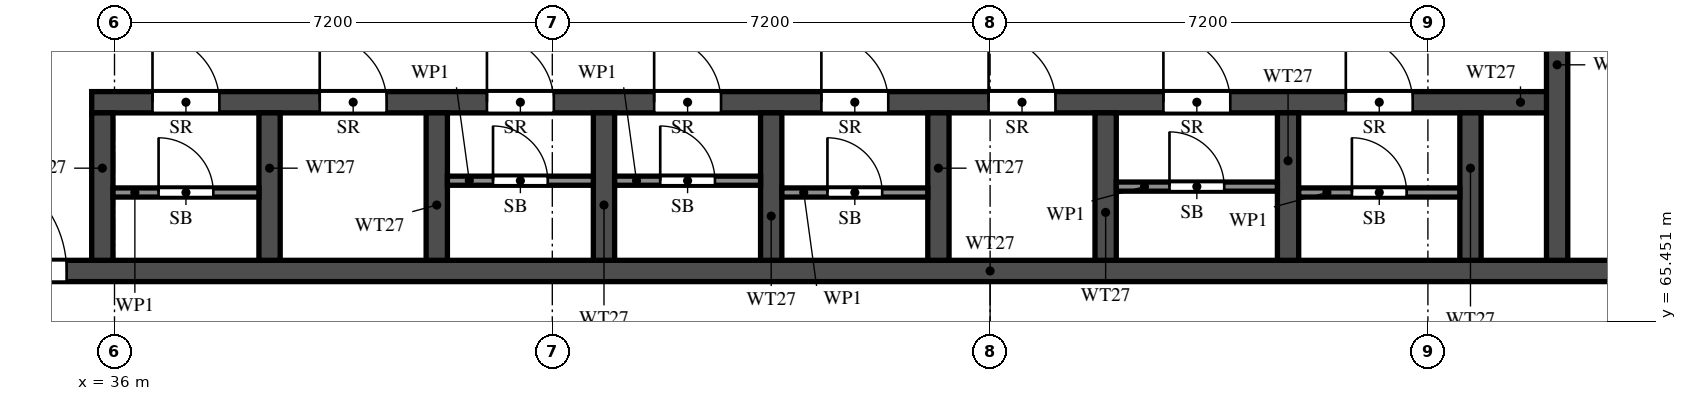
"""IFC4 building model, lengths in metres.
Left out: names, types, materials, properties, quantities, classifications, styles, units other than length and angle.
Written with IfcOpenShell. Run it as: python <this file> out.ifc"""

import sys

from ifc_helpers import new_model, si_unit, direction, frame, frame_2d, origin, place, context, subcontext, project, spatial, rectangle, extrude, element, fill, save


model = new_model("IFC4")
c1 = context("Model", 3, precision=1e-05, world=origin(), true_north=direction((0.0, 1.0)))
c2 = subcontext(c1, "Body", "Model", "MODEL_VIEW")
j1 = project(units=[si_unit("LENGTHUNIT", "METRE"), si_unit("PLANEANGLEUNIT", "RADIAN")], contexts=[c1])
p1 = place(None, origin())
s1 = spatial("IfcSite", under=j1, at=p1, CompositionType="ELEMENT")
p2 = place(p1, origin())
s2 = spatial("IfcBuilding", under=s1, at=p2, CompositionType="ELEMENT")
p3 = place(p2, frame((0.0, 0.0, 181.5)))
s3 = spatial("IfcBuildingStorey", under=s2, at=p3, CompositionType="ELEMENT", Elevation=181.5)
p4 = place(p3, frame((29.7, 66.275, 0.0), z_axis=(0.0, 0.0, 1.0), x_axis=(1.0, 0.0, 0.0)))
e1 = element("IfcWall", 1, at=p4, inside=s3, PredefinedType="SHEAR", context=c2, shape_type="SweptSolid", body=[
    extrude(rectangle(XDim=41.4, YDim=0.35, at=frame_2d((20.7, 0.0))), origin(), (0.0, 0.0, 1.0), 3.2),
])
p5 = place(p4, frame((0.925, 0.0, 0.0)))
e2 = element("IfcOpeningElement", 2, at=p5, cuts=e1, PredefinedType="OPENING", context=c2, shape_type="SweptSolid", body=[
    extrude(rectangle(XDim=1.1, YDim=2.1, at=frame_2d((0.55, 1.05))), frame((0.0, 0.185, 0.0), z_axis=(0.0, -1.0, 0.0), x_axis=(1.0, 0.0, 0.0)), (0.0, 0.0, 1.0), 0.37),
])
p6 = place(p4, frame((3.712, 0.0, 0.0)))
e3 = element("IfcOpeningElement", 3, at=p6, cuts=e1, PredefinedType="OPENING", context=c2, shape_type="SweptSolid", body=[
    extrude(rectangle(XDim=1.8, YDim=2.1, at=frame_2d((0.9, 1.05))), frame((0.0, 0.185, 0.0), z_axis=(0.0, -1.0, 0.0), x_axis=(1.0, 0.0, 0.0)), (0.0, 0.0, 1.0), 0.37),
])
p7 = place(p3, frame((35.625, 69.05, 0.0), z_axis=(0.0, 0.0, 1.0), x_axis=(1.0, 0.0, 0.0)))
e4 = element("IfcWall", 4, at=p7, inside=s3, PredefinedType="SHEAR", context=c2, shape_type="SweptSolid", body=[
    extrude(rectangle(XDim=24.1, YDim=0.35, at=frame_2d((12.05, 0.0))), origin(), (0.0, 0.0, 1.0), 3.2),
])
p8 = place(p7, frame((1.0, 0.0, 0.0)))
e5 = element("IfcOpeningElement", 5, at=p8, cuts=e4, PredefinedType="OPENING", context=c2, shape_type="SweptSolid", body=[
    extrude(rectangle(XDim=1.1, YDim=2.1, at=frame_2d((0.55, 1.05))), frame((0.0, 0.185, 0.0), z_axis=(0.0, -1.0, 0.0), x_axis=(1.0, 0.0, 0.0)), (0.0, 0.0, 1.0), 0.37),
])
p9 = place(p7, frame((3.75, 0.0, 0.0)))
e6 = element("IfcOpeningElement", 6, at=p9, cuts=e4, PredefinedType="OPENING", context=c2, shape_type="SweptSolid", body=[
    extrude(rectangle(XDim=1.1, YDim=2.1, at=frame_2d((0.55, 1.05))), frame((0.0, 0.185, 0.0), z_axis=(0.0, -1.0, 0.0), x_axis=(1.0, 0.0, 0.0)), (0.0, 0.0, 1.0), 0.37),
])
p10 = place(p7, frame((6.5, 0.0, 0.0)))
e7 = element("IfcOpeningElement", 7, at=p10, cuts=e4, PredefinedType="OPENING", context=c2, shape_type="SweptSolid", body=[
    extrude(rectangle(XDim=1.1, YDim=2.1, at=frame_2d((0.55, 1.05))), frame((0.0, 0.185, 0.0), z_axis=(0.0, -1.0, 0.0), x_axis=(1.0, 0.0, 0.0)), (0.0, 0.0, 1.0), 0.37),
])
p11 = place(p7, frame((9.25, 0.0, 0.0)))
e8 = element("IfcOpeningElement", 8, at=p11, cuts=e4, PredefinedType="OPENING", context=c2, shape_type="SweptSolid", body=[
    extrude(rectangle(XDim=1.1, YDim=2.1, at=frame_2d((0.55, 1.05))), frame((0.0, 0.185, 0.0), z_axis=(0.0, -1.0, 0.0), x_axis=(1.0, 0.0, 0.0)), (0.0, 0.0, 1.0), 0.37),
])
p12 = place(p7, frame((12.0, 0.0, 0.0)))
e9 = element("IfcOpeningElement", 9, at=p12, cuts=e4, PredefinedType="OPENING", context=c2, shape_type="SweptSolid", body=[
    extrude(rectangle(XDim=1.1, YDim=2.1, at=frame_2d((0.55, 1.05))), frame((0.0, 0.185, 0.0), z_axis=(0.0, -1.0, 0.0), x_axis=(1.0, 0.0, 0.0)), (0.0, 0.0, 1.0), 0.37),
])
p13 = place(p7, frame((14.75, 0.0, 0.0)))
e10 = element("IfcOpeningElement", 10, at=p13, cuts=e4, PredefinedType="OPENING", context=c2, shape_type="SweptSolid", body=[
    extrude(rectangle(XDim=1.1, YDim=2.1, at=frame_2d((0.55, 1.05))), frame((0.0, 0.185, 0.0), z_axis=(0.0, -1.0, 0.0), x_axis=(1.0, 0.0, 0.0)), (0.0, 0.0, 1.0), 0.37),
])
p14 = place(p7, frame((17.625, 0.0, 0.0)))
e11 = element("IfcOpeningElement", 11, at=p14, cuts=e4, PredefinedType="OPENING", context=c2, shape_type="SweptSolid", body=[
    extrude(rectangle(XDim=1.1, YDim=2.1, at=frame_2d((0.55, 1.05))), frame((0.0, 0.185, 0.0), z_axis=(0.0, -1.0, 0.0), x_axis=(1.0, 0.0, 0.0)), (0.0, 0.0, 1.0), 0.37),
])
p15 = place(p7, frame((20.625, 0.0, 0.0)))
e12 = element("IfcOpeningElement", 12, at=p15, cuts=e4, PredefinedType="OPENING", context=c2, shape_type="SweptSolid", body=[
    extrude(rectangle(XDim=1.1, YDim=2.1, at=frame_2d((0.55, 1.05))), frame((0.0, 0.185, 0.0), z_axis=(0.0, -1.0, 0.0), x_axis=(1.0, 0.0, 0.0)), (0.0, 0.0, 1.0), 0.37),
])
p16 = place(p3, frame((59.725, 66.45, 0.0), z_axis=(0.0, 0.0, 1.0), x_axis=(0.0, 1.0, 0.0)))
e13 = element("IfcWall", 13, at=p16, inside=s3, PredefinedType="SHEAR", context=c2, shape_type="SweptSolid", body=[
    extrude(rectangle(XDim=6.125, YDim=0.35, at=frame_2d((3.062, 0.0))), origin(), (0.0, 0.0, 1.0), 3.2),
])
p17 = place(p16, frame((3.85, 0.0, 0.0)))
e14 = element("IfcOpeningElement", 14, at=p17, cuts=e13, PredefinedType="OPENING", context=c2, shape_type="SweptSolid", body=[
    extrude(rectangle(XDim=1.2, YDim=2.1, at=frame_2d((0.6, 1.05))), frame((0.0, 0.185, 0.0), z_axis=(0.0, -1.0, 0.0), x_axis=(1.0, 0.0, 0.0)), (0.0, 0.0, 1.0), 0.37),
])
for number, where, z_axis, x_axis in (
    (15, (35.8, 66.45, 0.0), (0.0, 0.0, 1.0), (0.0, 1.0, 0.0)),
    (16, (38.55, 66.45, 0.0), (0.0, 0.0, 1.0), (0.0, 1.0, 0.0)),
    (17, (41.3, 66.45, 0.0), (0.0, 0.0, 1.0), (0.0, 1.0, 0.0)),
    (18, (44.05, 66.45, 0.0), (0.0, 0.0, 1.0), (0.0, 1.0, 0.0)),
    (19, (46.8, 66.45, 0.0), (0.0, 0.0, 1.0), (0.0, 1.0, 0.0)),
    (20, (49.55, 66.45, 0.0), (0.0, 0.0, 1.0), (0.0, 1.0, 0.0)),
    (21, (52.3, 66.45, 0.0), (0.0, 0.0, 1.0), (0.0, 1.0, 0.0)),
    (22, (55.3, 66.45, 0.0), (0.0, 0.0, 1.0), (0.0, 1.0, 0.0)),
    (23, (58.3, 66.45, 0.0), (0.0, 0.0, 1.0), (0.0, 1.0, 0.0)),
):
    element("IfcWall", number, at=place(p3, frame(where, z_axis=z_axis, x_axis=x_axis)), inside=s3, PredefinedType="SHEAR", context=c2, shape_type="SweptSolid", body=[
        extrude(rectangle(XDim=2.425, YDim=0.35, at=frame_2d((1.212, 0.0))), origin(), (0.0, 0.0, 1.0), 3.2),
    ])
p18 = place(p3, frame((35.975, 67.565, 0.0), z_axis=(0.0, 0.0, 1.0), x_axis=(1.0, 0.0, 0.0)))
e24 = element("IfcWall", 24, at=p18, inside=s3, PredefinedType="PARTITIONING", context=c2, shape_type="SweptSolid", body=[
    extrude(rectangle(XDim=2.4, YDim=0.15, at=frame_2d((1.2, 0.0))), origin(), (0.0, 0.0, 1.0), 3.2),
])
p19 = place(p18, frame((0.75, 0.0, 0.0)))
e25 = element("IfcOpeningElement", 25, at=p19, cuts=e24, PredefinedType="OPENING", context=c2, shape_type="SweptSolid", body=[
    extrude(rectangle(XDim=0.9, YDim=2.1, at=frame_2d((0.45, 1.05))), frame((0.0, 0.085, 0.0), z_axis=(0.0, -1.0, 0.0), x_axis=(1.0, 0.0, 0.0)), (0.0, 0.0, 1.0), 0.17),
])
p20 = place(p3, frame((41.475, 67.76, 0.0), z_axis=(0.0, 0.0, 1.0), x_axis=(1.0, 0.0, 0.0)))
e26 = element("IfcWall", 26, at=p20, inside=s3, PredefinedType="PARTITIONING", context=c2, shape_type="SweptSolid", body=[
    extrude(rectangle(XDim=2.4, YDim=0.15, at=frame_2d((1.2, 0.0))), origin(), (0.0, 0.0, 1.0), 3.2),
])
p21 = place(p20, frame((0.75, 0.0, 0.0)))
e27 = element("IfcOpeningElement", 27, at=p21, cuts=e26, PredefinedType="OPENING", context=c2, shape_type="SweptSolid", body=[
    extrude(rectangle(XDim=0.9, YDim=2.1, at=frame_2d((0.45, 1.05))), frame((0.0, 0.085, 0.0), z_axis=(0.0, -1.0, 0.0), x_axis=(1.0, 0.0, 0.0)), (0.0, 0.0, 1.0), 0.17),
])
p22 = place(p3, frame((44.225, 67.76, 0.0), z_axis=(0.0, 0.0, 1.0), x_axis=(1.0, 0.0, 0.0)))
e28 = element("IfcWall", 28, at=p22, inside=s3, PredefinedType="PARTITIONING", context=c2, shape_type="SweptSolid", body=[
    extrude(rectangle(XDim=2.4, YDim=0.15, at=frame_2d((1.2, 0.0))), origin(), (0.0, 0.0, 1.0), 3.2),
])
p23 = place(p22, frame((0.75, 0.0, 0.0)))
e29 = element("IfcOpeningElement", 29, at=p23, cuts=e28, PredefinedType="OPENING", context=c2, shape_type="SweptSolid", body=[
    extrude(rectangle(XDim=0.9, YDim=2.1, at=frame_2d((0.45, 1.05))), frame((0.0, 0.085, 0.0), z_axis=(0.0, -1.0, 0.0), x_axis=(1.0, 0.0, 0.0)), (0.0, 0.0, 1.0), 0.17),
])
p24 = place(p3, frame((46.975, 67.565, 0.0), z_axis=(0.0, 0.0, 1.0), x_axis=(1.0, 0.0, 0.0)))
e30 = element("IfcWall", 30, at=p24, inside=s3, PredefinedType="PARTITIONING", context=c2, shape_type="SweptSolid", body=[
    extrude(rectangle(XDim=2.4, YDim=0.15, at=frame_2d((1.2, 0.0))), origin(), (0.0, 0.0, 1.0), 3.2),
])
p25 = place(p24, frame((0.75, 0.0, 0.0)))
e31 = element("IfcOpeningElement", 31, at=p25, cuts=e30, PredefinedType="OPENING", context=c2, shape_type="SweptSolid", body=[
    extrude(rectangle(XDim=0.9, YDim=2.1, at=frame_2d((0.45, 1.05))), frame((0.0, 0.085, 0.0), z_axis=(0.0, -1.0, 0.0), x_axis=(1.0, 0.0, 0.0)), (0.0, 0.0, 1.0), 0.17),
])
p26 = place(p3, frame((52.475, 67.663, 0.0), z_axis=(0.0, 0.0, 1.0), x_axis=(1.0, 0.0, 0.0)))
e32 = element("IfcWall", 32, at=p26, inside=s3, PredefinedType="PARTITIONING", context=c2, shape_type="SweptSolid", body=[
    extrude(rectangle(XDim=2.65, YDim=0.15, at=frame_2d((1.325, 0.0))), origin(), (0.0, 0.0, 1.0), 3.2),
])
p27 = place(p26, frame((0.875, 0.0, 0.0)))
e33 = element("IfcOpeningElement", 33, at=p27, cuts=e32, PredefinedType="OPENING", context=c2, shape_type="SweptSolid", body=[
    extrude(rectangle(XDim=0.9, YDim=2.1, at=frame_2d((0.45, 1.05))), frame((0.0, 0.085, 0.0), z_axis=(0.0, -1.0, 0.0), x_axis=(1.0, 0.0, 0.0)), (0.0, 0.0, 1.0), 0.17),
])
p28 = place(p3, frame((55.475, 67.565, 0.0), z_axis=(0.0, 0.0, 1.0), x_axis=(1.0, 0.0, 0.0)))
e34 = element("IfcWall", 34, at=p28, inside=s3, PredefinedType="PARTITIONING", context=c2, shape_type="SweptSolid", body=[
    extrude(rectangle(XDim=2.65, YDim=0.15, at=frame_2d((1.325, 0.0))), origin(), (0.0, 0.0, 1.0), 3.2),
])
p29 = place(p28, frame((0.875, 0.0, 0.0)))
e35 = element("IfcOpeningElement", 35, at=p29, cuts=e34, PredefinedType="OPENING", context=c2, shape_type="SweptSolid", body=[
    extrude(rectangle(XDim=0.9, YDim=2.1, at=frame_2d((0.45, 1.05))), frame((0.0, 0.085, 0.0), z_axis=(0.0, -1.0, 0.0), x_axis=(1.0, 0.0, 0.0)), (0.0, 0.0, 1.0), 0.17),
])
p30 = place(p6, origin())
e36 = element("IfcDoor", 36, at=p30, inside=s3, OperationType="DOUBLE_DOOR_SINGLE_SWING", PredefinedType="DOOR", context=c2, shape_type="SweptSolid", body=[
    extrude(rectangle(XDim=1.8, YDim=2.1, at=frame_2d((0.9, 1.05))), frame((0.0, 0.025, 0.0), z_axis=(0.0, -1.0, 0.0), x_axis=(1.0, 0.0, 0.0)), (0.0, 0.0, 1.0), 0.05),
])
fill(e3, e36)
p31 = place(p8, origin())
e37 = element("IfcDoor", 37, at=p31, inside=s3, OperationType="SINGLE_SWING_RIGHT", PredefinedType="DOOR", context=c2, shape_type="SweptSolid", body=[
    extrude(rectangle(XDim=1.1, YDim=2.1, at=frame_2d((0.55, 1.05))), frame((0.0, 0.025, 0.0), z_axis=(0.0, -1.0, 0.0), x_axis=(1.0, 0.0, 0.0)), (0.0, 0.0, 1.0), 0.05),
])
fill(e5, e37)
p32 = place(p19, origin())
e38 = element("IfcDoor", 38, at=p32, inside=s3, OperationType="SINGLE_SWING_RIGHT", PredefinedType="DOOR", context=c2, shape_type="SweptSolid", body=[
    extrude(rectangle(XDim=0.9, YDim=2.1, at=frame_2d((0.45, 1.05))), frame((0.0, 0.025, 0.0), z_axis=(0.0, -1.0, 0.0), x_axis=(1.0, 0.0, 0.0)), (0.0, 0.0, 1.0), 0.05),
])
fill(e25, e38)
p33 = place(p9, origin())
e39 = element("IfcDoor", 39, at=p33, inside=s3, OperationType="SINGLE_SWING_LEFT", PredefinedType="DOOR", context=c2, shape_type="SweptSolid", body=[
    extrude(rectangle(XDim=1.1, YDim=2.1, at=frame_2d((0.55, 1.05))), frame((0.0, 0.025, 0.0), z_axis=(0.0, -1.0, 0.0), x_axis=(1.0, 0.0, 0.0)), (0.0, 0.0, 1.0), 0.05),
])
fill(e6, e39)
p34 = place(p10, origin())
e40 = element("IfcDoor", 40, at=p34, inside=s3, OperationType="SINGLE_SWING_RIGHT", PredefinedType="DOOR", context=c2, shape_type="SweptSolid", body=[
    extrude(rectangle(XDim=1.1, YDim=2.1, at=frame_2d((0.55, 1.05))), frame((0.0, 0.025, 0.0), z_axis=(0.0, -1.0, 0.0), x_axis=(1.0, 0.0, 0.0)), (0.0, 0.0, 1.0), 0.05),
])
fill(e7, e40)
p35 = place(p21, origin())
e41 = element("IfcDoor", 41, at=p35, inside=s3, OperationType="SINGLE_SWING_LEFT", PredefinedType="DOOR", context=c2, shape_type="SweptSolid", body=[
    extrude(rectangle(XDim=0.9, YDim=2.1, at=frame_2d((0.45, 1.05))), frame((0.0, 0.025, 0.0), z_axis=(0.0, -1.0, 0.0), x_axis=(1.0, 0.0, 0.0)), (0.0, 0.0, 1.0), 0.05),
])
fill(e27, e41)
p36 = place(p11, origin())
e42 = element("IfcDoor", 42, at=p36, inside=s3, OperationType="SINGLE_SWING_LEFT", PredefinedType="DOOR", context=c2, shape_type="SweptSolid", body=[
    extrude(rectangle(XDim=1.1, YDim=2.1, at=frame_2d((0.55, 1.05))), frame((0.0, 0.025, 0.0), z_axis=(0.0, -1.0, 0.0), x_axis=(1.0, 0.0, 0.0)), (0.0, 0.0, 1.0), 0.05),
])
fill(e8, e42)
p37 = place(p23, origin())
e43 = element("IfcDoor", 43, at=p37, inside=s3, OperationType="SINGLE_SWING_RIGHT", PredefinedType="DOOR", context=c2, shape_type="SweptSolid", body=[
    extrude(rectangle(XDim=0.9, YDim=2.1, at=frame_2d((0.45, 1.05))), frame((0.0, 0.025, 0.0), z_axis=(0.0, -1.0, 0.0), x_axis=(1.0, 0.0, 0.0)), (0.0, 0.0, 1.0), 0.05),
])
fill(e29, e43)
p38 = place(p12, origin())
e44 = element("IfcDoor", 44, at=p38, inside=s3, OperationType="SINGLE_SWING_RIGHT", PredefinedType="DOOR", context=c2, shape_type="SweptSolid", body=[
    extrude(rectangle(XDim=1.1, YDim=2.1, at=frame_2d((0.55, 1.05))), frame((0.0, 0.025, 0.0), z_axis=(0.0, -1.0, 0.0), x_axis=(1.0, 0.0, 0.0)), (0.0, 0.0, 1.0), 0.05),
])
fill(e9, e44)
p39 = place(p25, origin())
e45 = element("IfcDoor", 45, at=p39, inside=s3, OperationType="SINGLE_SWING_RIGHT", PredefinedType="DOOR", context=c2, shape_type="SweptSolid", body=[
    extrude(rectangle(XDim=0.9, YDim=2.1, at=frame_2d((0.45, 1.05))), frame((0.0, 0.025, 0.0), z_axis=(0.0, -1.0, 0.0), x_axis=(1.0, 0.0, 0.0)), (0.0, 0.0, 1.0), 0.05),
])
fill(e31, e45)
p40 = place(p13, origin())
e46 = element("IfcDoor", 46, at=p40, inside=s3, OperationType="SINGLE_SWING_LEFT", PredefinedType="DOOR", context=c2, shape_type="SweptSolid", body=[
    extrude(rectangle(XDim=1.1, YDim=2.1, at=frame_2d((0.55, 1.05))), frame((0.0, 0.025, 0.0), z_axis=(0.0, -1.0, 0.0), x_axis=(1.0, 0.0, 0.0)), (0.0, 0.0, 1.0), 0.05),
])
fill(e10, e46)
p41 = place(p14, origin())
e47 = element("IfcDoor", 47, at=p41, inside=s3, OperationType="SINGLE_SWING_RIGHT", PredefinedType="DOOR", context=c2, shape_type="SweptSolid", body=[
    extrude(rectangle(XDim=1.1, YDim=2.1, at=frame_2d((0.55, 1.05))), frame((0.0, 0.025, 0.0), z_axis=(0.0, -1.0, 0.0), x_axis=(1.0, 0.0, 0.0)), (0.0, 0.0, 1.0), 0.05),
])
fill(e11, e47)
p42 = place(p27, origin())
e48 = element("IfcDoor", 48, at=p42, inside=s3, OperationType="SINGLE_SWING_LEFT", PredefinedType="DOOR", context=c2, shape_type="SweptSolid", body=[
    extrude(rectangle(XDim=0.9, YDim=2.1, at=frame_2d((0.45, 1.05))), frame((0.0, 0.025, 0.0), z_axis=(0.0, -1.0, 0.0), x_axis=(1.0, 0.0, 0.0)), (0.0, 0.0, 1.0), 0.05),
])
fill(e33, e48)
p43 = place(p15, origin())
e49 = element("IfcDoor", 49, at=p43, inside=s3, OperationType="SINGLE_SWING_RIGHT", PredefinedType="DOOR", context=c2, shape_type="SweptSolid", body=[
    extrude(rectangle(XDim=1.1, YDim=2.1, at=frame_2d((0.55, 1.05))), frame((0.0, 0.025, 0.0), z_axis=(0.0, -1.0, 0.0), x_axis=(1.0, 0.0, 0.0)), (0.0, 0.0, 1.0), 0.05),
])
fill(e12, e49)
p44 = place(p29, origin())
e50 = element("IfcDoor", 50, at=p44, inside=s3, OperationType="SINGLE_SWING_RIGHT", PredefinedType="DOOR", context=c2, shape_type="SweptSolid", body=[
    extrude(rectangle(XDim=0.9, YDim=2.1, at=frame_2d((0.45, 1.05))), frame((0.0, 0.025, 0.0), z_axis=(0.0, -1.0, 0.0), x_axis=(1.0, 0.0, 0.0)), (0.0, 0.0, 1.0), 0.05),
])
fill(e35, e50)
save(model, sys.argv[1])
